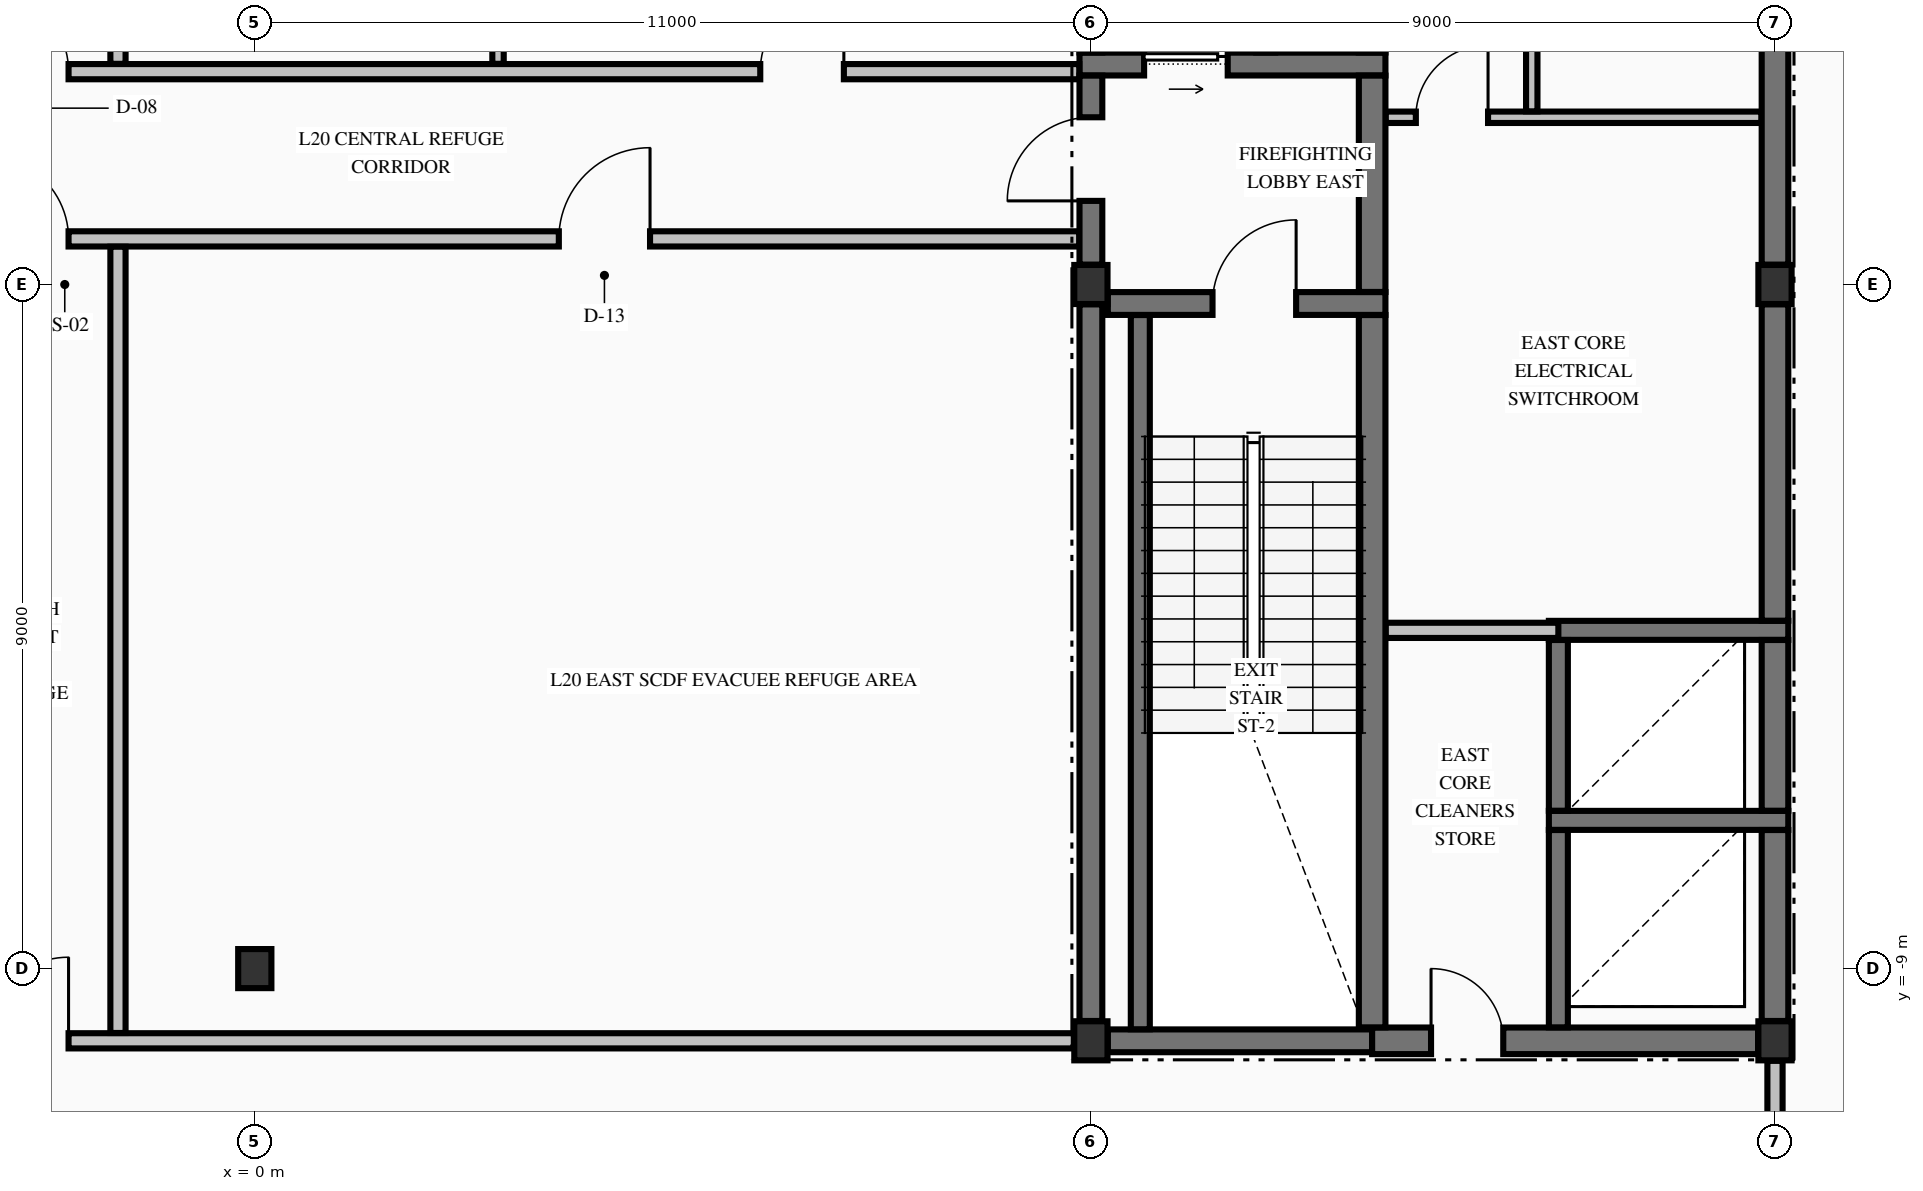
"""IFC4 building model, lengths in metres.
Left out: names, types, materials, properties, quantities, classifications, styles, units other than length and angle.
Written with IfcOpenShell. Run it as: python <this file> out.ifc"""

import sys

from ifc_helpers import new_model, si_unit, direction, frame, frame_2d, origin, origin_2d, place, context, subcontext, project, spatial, rectangle, i_section, extrude, element, fill, save


model = new_model("IFC4")
c1 = context("Model", 3, precision=1e-05, world=origin(), true_north=direction((0.0, 1.0)))
c2 = subcontext(c1, "Body", "Model", "MODEL_VIEW")
j1 = project(units=[si_unit("LENGTHUNIT", "METRE"), si_unit("PLANEANGLEUNIT", "RADIAN")], contexts=[c1])
p1 = place(None, origin())
s1 = spatial("IfcSite", under=j1, at=p1, CompositionType="ELEMENT")
p2 = place(p1, origin())
s2 = spatial("IfcBuilding", under=s1, at=p2, CompositionType="ELEMENT")
p3 = place(p2, frame((0.0, 0.0, 82.18)))
s3 = spatial("IfcBuildingStorey", under=s2, at=p3, CompositionType="ELEMENT", Elevation=82.18)
for number, where, z_axis, x_axis in (
    (1, (11.0, -9.95, -0.425), (0.0, 0.0, 1.0), (1.0, 0.0, 0.0)),
    (2, (11.0, 0.0, -0.425), (0.0, 0.0, 1.0), (1.0, 0.0, 0.0)),
    (3, (20.0, -9.95, -0.425), (0.0, 0.0, 1.0), (1.0, 0.0, 0.0)),
    (4, (0.0, -9.0, -0.425), (0.0, 0.0, 1.0), (1.0, 0.0, 0.0)),
    (5, (20.0, 0.0, -0.425), (0.0, 0.0, 1.0), (1.0, 0.0, 0.0)),
):
    element("IfcColumn", number, at=place(p3, frame(where, z_axis=z_axis, x_axis=x_axis)), inside=s3, PredefinedType="COLUMN", context=c2, shape_type="SweptSolid", body=[
        extrude(i_section(OverallWidth=0.437, OverallDepth=0.514, WebThickness=0.061, FlangeThickness=0.097, FilletRadius=0.015, at=origin_2d()), origin(), (0.0, 0.0, 1.0), 4.76),
    ])
p4 = place(p3, frame((11.222, -9.95, 0.0), z_axis=(0.0, 0.0, 1.0), x_axis=(1.0, 0.0, 0.0)))
e6 = element("IfcWall", 6, at=p4, inside=s3, PredefinedType="SHEAR", context=c2, shape_type="SweptSolid", body=[
    extrude(rectangle(XDim=3.478, YDim=0.3, at=frame_2d((1.739, 0.0))), origin(), (0.0, 0.0, 1.0), 4.335),
])
p5 = place(p3, frame((14.7, -9.95, 0.0), z_axis=(0.0, 0.0, 1.0), x_axis=(1.0, 0.0, 0.0)))
e7 = element("IfcWall", 7, at=p5, inside=s3, PredefinedType="SHEAR", context=c2, shape_type="SweptSolid", body=[
    extrude(rectangle(XDim=5.078, YDim=0.35, at=frame_2d((2.539, 0.0))), origin(), (0.0, 0.0, 1.0), 4.335),
])
p6 = place(p5, frame((0.775, 0.0, 0.0)))
e8 = element("IfcOpeningElement", 8, at=p6, cuts=e7, PredefinedType="OPENING", context=c2, shape_type="SweptSolid", body=[
    extrude(rectangle(XDim=0.95, YDim=2.15, at=frame_2d((0.475, 1.075))), frame((0.0, 0.185, 0.0), z_axis=(0.0, -1.0, 0.0), x_axis=(1.0, 0.0, 0.0)), (0.0, 0.0, 1.0), 0.37),
])
for number, where, z_axis, x_axis in (
    (9, (17.025, -7.05, 0.0), (0.0, 0.0, 1.0), (1.0, 0.0, 0.0)),
    (10, (17.025, -4.55, 0.0), (0.0, 0.0, 1.0), (1.0, 0.0, 0.0)),
):
    element("IfcWall", number, at=place(p3, frame(where, z_axis=z_axis, x_axis=x_axis)), inside=s3, PredefinedType="SOLIDWALL", context=c2, shape_type="SweptSolid", body=[
        extrude(rectangle(XDim=3.15, YDim=0.25, at=frame_2d((1.575, 0.0))), origin(), (0.0, 0.0, 1.0), 4.335),
    ])
p7 = place(p3, frame((11.222, -0.25, 0.0), z_axis=(0.0, 0.0, 1.0), x_axis=(1.0, 0.0, 0.0)))
e11 = element("IfcWall", 11, at=p7, inside=s3, PredefinedType="SHEAR", context=c2, shape_type="SweptSolid", body=[
    extrude(rectangle(XDim=3.653, YDim=0.3, at=frame_2d((1.826, 0.0))), origin(), (0.0, 0.0, 1.0), 4.335),
])
p8 = place(p7, frame((1.377, 0.0, 0.0)))
e12 = element("IfcOpeningElement", 12, at=p8, cuts=e11, PredefinedType="OPENING", context=c2, shape_type="SweptSolid", body=[
    extrude(rectangle(XDim=1.1, YDim=2.15, at=frame_2d((0.55, 1.075))), frame((0.0, 0.16, 0.0), z_axis=(0.0, -1.0, 0.0), x_axis=(1.0, 0.0, 0.0)), (0.0, 0.0, 1.0), 0.32),
])
p9 = place(p3, frame((10.85, 2.9, 0.0), z_axis=(0.0, 0.0, 1.0), x_axis=(1.0, 0.0, 0.0)))
e13 = element("IfcWall", 13, at=p9, inside=s3, PredefinedType="SHEAR", context=c2, shape_type="SweptSolid", body=[
    extrude(rectangle(XDim=4.025, YDim=0.3, at=frame_2d((2.012, 0.0))), origin(), (0.0, 0.0, 1.0), 4.335),
])
p10 = place(p9, frame((0.85, 0.0, 0.0)))
e14 = element("IfcOpeningElement", 14, at=p10, cuts=e13, PredefinedType="OPENING", context=c2, shape_type="SweptSolid", body=[
    extrude(rectangle(XDim=1.1, YDim=2.2, at=frame_2d((0.55, 1.1))), frame((0.0, 0.16, 0.0), z_axis=(0.0, -1.0, 0.0), x_axis=(1.0, 0.0, 0.0)), (0.0, 0.0, 1.0), 0.32),
])
p11 = place(p3, frame((-10.775, -9.95, 0.0), z_axis=(0.0, 0.0, 1.0), x_axis=(1.0, 0.0, 0.0)))
e15 = element("IfcWall", 15, at=p11, inside=s3, PredefinedType="PARTITIONING", context=c2, shape_type="SweptSolid", body=[
    extrude(rectangle(XDim=21.551, YDim=0.2, at=frame_2d((10.775, 0.0))), origin(), (0.0, 0.0, 1.0), 4.335),
])
p12 = place(p11, frame((7.226, 0.0, 0.0)))
e16 = element("IfcOpeningElement", 16, at=p12, cuts=e15, PredefinedType="OPENING", context=c2, shape_type="SweptSolid", body=[
    extrude(rectangle(XDim=1.1, YDim=2.15, at=frame_2d((0.55, 1.075))), frame((0.0, 0.11, 0.0), z_axis=(0.0, -1.0, 0.0), x_axis=(1.0, 0.0, 0.0)), (0.0, 0.0, 1.0), 0.22),
])
p13 = place(p3, frame((14.878, -4.55, 0.0), z_axis=(0.0, 0.0, 1.0), x_axis=(1.0, 0.0, 0.0)))
e17 = element("IfcWall", 17, at=p13, inside=s3, PredefinedType="PARTITIONING", context=c2, shape_type="SweptSolid", body=[
    extrude(rectangle(XDim=2.272, YDim=0.2, at=frame_2d((1.136, 0.0))), origin(), (0.0, 0.0, 1.0), 4.335),
])
p14 = place(p3, frame((-10.847, 0.6, 0.0), z_axis=(0.0, 0.0, 1.0), x_axis=(1.0, 0.0, 0.0)))
e18 = element("IfcWall", 18, at=p14, inside=s3, PredefinedType="PARTITIONING", context=c2, shape_type="SweptSolid", body=[
    extrude(rectangle(XDim=21.694, YDim=0.2, at=frame_2d((10.847, 0.0))), origin(), (0.0, 0.0, 1.0), 4.335),
])
p15 = place(p14, frame((7.297, 0.0, 0.0)))
e19 = element("IfcOpeningElement", 19, at=p15, cuts=e18, PredefinedType="OPENING", context=c2, shape_type="SweptSolid", body=[
    extrude(rectangle(XDim=1.1, YDim=2.15, at=frame_2d((0.55, 1.075))), frame((0.0, 0.11, 0.0), z_axis=(0.0, -1.0, 0.0), x_axis=(1.0, 0.0, 0.0)), (0.0, 0.0, 1.0), 0.22),
])
p16 = place(p14, frame((2.647, 0.0, 0.0)))
e20 = element("IfcOpeningElement", 20, at=p16, cuts=e18, PredefinedType="OPENING", context=c2, shape_type="SweptSolid", body=[
    extrude(rectangle(XDim=1.2, YDim=2.15, at=frame_2d((0.6, 1.075))), frame((0.0, 0.11, 0.0), z_axis=(0.0, -1.0, 0.0), x_axis=(1.0, 0.0, 0.0)), (0.0, 0.0, 1.0), 0.22),
])
p17 = place(p14, frame((14.847, 0.0, 0.0)))
e21 = element("IfcOpeningElement", 21, at=p17, cuts=e18, PredefinedType="OPENING", context=c2, shape_type="SweptSolid", body=[
    extrude(rectangle(XDim=1.2, YDim=2.15, at=frame_2d((0.6, 1.075))), frame((0.0, 0.11, 0.0), z_axis=(0.0, -1.0, 0.0), x_axis=(1.0, 0.0, 0.0)), (0.0, 0.0, 1.0), 0.22),
])
p18 = place(p3, frame((14.878, 2.2, 0.0), z_axis=(0.0, 0.0, 1.0), x_axis=(1.0, 0.0, 0.0)))
e22 = element("IfcWall", 22, at=p18, inside=s3, PredefinedType="PARTITIONING", context=c2, shape_type="SweptSolid", body=[
    extrude(rectangle(XDim=4.944, YDim=0.15, at=frame_2d((2.472, 0.0))), origin(), (0.0, 0.0, 1.0), 4.335),
])
p19 = place(p18, frame((0.397, 0.0, 0.0)))
e23 = element("IfcOpeningElement", 23, at=p19, cuts=e22, PredefinedType="OPENING", context=c2, shape_type="SweptSolid", body=[
    extrude(rectangle(XDim=0.95, YDim=2.15, at=frame_2d((0.475, 1.075))), frame((0.0, 0.085, 0.0), z_axis=(0.0, -1.0, 0.0), x_axis=(1.0, 0.0, 0.0)), (0.0, 0.0, 1.0), 0.17),
])
p20 = place(p3, frame((-10.847, 2.8, 0.0), z_axis=(0.0, 0.0, 1.0), x_axis=(1.0, 0.0, 0.0)))
e24 = element("IfcWall", 24, at=p20, inside=s3, PredefinedType="PARTITIONING", context=c2, shape_type="SweptSolid", body=[
    extrude(rectangle(XDim=21.694, YDim=0.2, at=frame_2d((10.847, 0.0))), origin(), (0.0, 0.0, 1.0), 4.335),
])
p21 = place(p20, frame((7.297, 0.0, 0.0)))
e25 = element("IfcOpeningElement", 25, at=p21, cuts=e24, PredefinedType="OPENING", context=c2, shape_type="SweptSolid", body=[
    extrude(rectangle(XDim=1.1, YDim=2.15, at=frame_2d((0.55, 1.075))), frame((0.0, 0.11, 0.0), z_axis=(0.0, -1.0, 0.0), x_axis=(1.0, 0.0, 0.0)), (0.0, 0.0, 1.0), 0.22),
])
p22 = place(p20, frame((17.497, 0.0, 0.0)))
e26 = element("IfcOpeningElement", 26, at=p22, cuts=e24, PredefinedType="OPENING", context=c2, shape_type="SweptSolid", body=[
    extrude(rectangle(XDim=1.1, YDim=2.15, at=frame_2d((0.55, 1.075))), frame((0.0, 0.11, 0.0), z_axis=(0.0, -1.0, 0.0), x_axis=(1.0, 0.0, 0.0)), (0.0, 0.0, 1.0), 0.22),
])
p23 = place(p3, frame((11.0, -9.689, 0.0), z_axis=(0.0, 0.0, 1.0), x_axis=(0.0, 1.0, 0.0)))
e27 = element("IfcWall", 27, at=p23, inside=s3, PredefinedType="SHEAR", context=c2, shape_type="SweptSolid", body=[
    extrude(rectangle(XDim=9.428, YDim=0.3, at=frame_2d((4.714, 0.0))), origin(), (0.0, 0.0, 1.0), 4.335),
])
p24 = place(p3, frame((11.0, 0.261, 0.0), z_axis=(0.0, 0.0, 1.0), x_axis=(0.0, 1.0, 0.0)))
e28 = element("IfcWall", 28, at=p24, inside=s3, PredefinedType="SHEAR", context=c2, shape_type="SweptSolid", body=[
    extrude(rectangle(XDim=2.487, YDim=0.3, at=frame_2d((1.244, 0.0))), origin(), (0.0, 0.0, 1.0), 4.335),
])
p25 = place(p24, frame((0.839, 0.0, 0.0)))
e29 = element("IfcOpeningElement", 29, at=p25, cuts=e28, PredefinedType="OPENING", context=c2, shape_type="SweptSolid", body=[
    extrude(rectangle(XDim=1.1, YDim=2.15, at=frame_2d((0.55, 1.075))), frame((0.0, 0.16, 0.0), z_axis=(0.0, -1.0, 0.0), x_axis=(1.0, 0.0, 0.0)), (0.0, 0.0, 1.0), 0.32),
])
p26 = place(p3, frame((11.0, 3.052, 0.0), z_axis=(0.0, 0.0, 1.0), x_axis=(0.0, 1.0, 0.0)))
e30 = element("IfcWall", 30, at=p26, inside=s3, PredefinedType="SHEAR", context=c2, shape_type="SweptSolid", body=[
    extrude(rectangle(XDim=2.496, YDim=0.3, at=frame_2d((1.248, 0.0))), origin(), (0.0, 0.0, 1.0), 4.335),
])
p27 = place(p3, frame((11.65, -9.798, 0.0), z_axis=(0.0, 0.0, 1.0), x_axis=(0.0, 1.0, 0.0)))
e31 = element("IfcWall", 31, at=p27, inside=s3, PredefinedType="SOLIDWALL", context=c2, shape_type="SweptSolid", body=[
    extrude(rectangle(XDim=9.396, YDim=0.25, at=frame_2d((4.698, 0.0))), origin(), (0.0, 0.0, 1.0), 4.335),
])
p28 = place(p3, frame((13.3, 3.052, 0.0), z_axis=(0.0, 0.0, 1.0), x_axis=(0.0, 1.0, 0.0)))
e32 = element("IfcWall", 32, at=p28, inside=s3, PredefinedType="SOLIDWALL", context=c2, shape_type="SweptSolid", body=[
    extrude(rectangle(XDim=2.496, YDim=0.25, at=frame_2d((1.248, 0.0))), origin(), (0.0, 0.0, 1.0), 4.335),
])
p29 = place(p3, frame((14.7, -9.773, 0.0), z_axis=(0.0, 0.0, 1.0), x_axis=(0.0, 1.0, 0.0)))
e33 = element("IfcWall", 33, at=p29, inside=s3, PredefinedType="SHEAR", context=c2, shape_type="SweptSolid", body=[
    extrude(rectangle(XDim=9.371, YDim=0.35, at=frame_2d((4.686, 0.0))), origin(), (0.0, 0.0, 1.0), 4.335),
])
p30 = place(p3, frame((14.7, -0.098, 0.0), z_axis=(0.0, 0.0, 1.0), x_axis=(0.0, 1.0, 0.0)))
e34 = element("IfcWall", 34, at=p30, inside=s3, PredefinedType="SHEAR", context=c2, shape_type="SweptSolid", body=[
    extrude(rectangle(XDim=2.846, YDim=0.35, at=frame_2d((1.423, 0.0))), origin(), (0.0, 0.0, 1.0), 4.335),
])
p31 = place(p3, frame((14.7, 3.052, 0.0), z_axis=(0.0, 0.0, 1.0), x_axis=(0.0, 1.0, 0.0)))
e35 = element("IfcWall", 35, at=p31, inside=s3, PredefinedType="SHEAR", context=c2, shape_type="SweptSolid", body=[
    extrude(rectangle(XDim=2.496, YDim=0.35, at=frame_2d((1.248, 0.0))), origin(), (0.0, 0.0, 1.0), 4.335),
])
p32 = place(p3, frame((17.15, -9.773, 0.0), z_axis=(0.0, 0.0, 1.0), x_axis=(0.0, 1.0, 0.0)))
e36 = element("IfcWall", 36, at=p32, inside=s3, PredefinedType="SOLIDWALL", context=c2, shape_type="SweptSolid", body=[
    extrude(rectangle(XDim=2.596, YDim=0.25, at=frame_2d((1.298, 0.0))), origin(), (0.0, 0.0, 1.0), 4.335),
])
p33 = place(p3, frame((17.15, -6.923, 0.0), z_axis=(0.0, 0.0, 1.0), x_axis=(0.0, 1.0, 0.0)))
e37 = element("IfcWall", 37, at=p33, inside=s3, PredefinedType="SOLIDWALL", context=c2, shape_type="SweptSolid", body=[
    extrude(rectangle(XDim=2.246, YDim=0.25, at=frame_2d((1.123, 0.0))), origin(), (0.0, 0.0, 1.0), 4.335),
])
p34 = place(p3, frame((20.0, -9.689, 0.0), z_axis=(0.0, 0.0, 1.0), x_axis=(0.0, 1.0, 0.0)))
e38 = element("IfcWall", 38, at=p34, inside=s3, PredefinedType="SHEAR", context=c2, shape_type="SweptSolid", body=[
    extrude(rectangle(XDim=2.512, YDim=0.35, at=frame_2d((1.256, 0.0))), origin(), (0.0, 0.0, 1.0), 4.335),
])
p35 = place(p3, frame((20.0, -6.923, 0.0), z_axis=(0.0, 0.0, 1.0), x_axis=(0.0, 1.0, 0.0)))
e39 = element("IfcWall", 39, at=p35, inside=s3, PredefinedType="SHEAR", context=c2, shape_type="SweptSolid", body=[
    extrude(rectangle(XDim=2.246, YDim=0.35, at=frame_2d((1.123, 0.0))), origin(), (0.0, 0.0, 1.0), 4.335),
])
p36 = place(p3, frame((20.0, -4.423, 0.0), z_axis=(0.0, 0.0, 1.0), x_axis=(0.0, 1.0, 0.0)))
e40 = element("IfcWall", 40, at=p36, inside=s3, PredefinedType="SHEAR", context=c2, shape_type="SweptSolid", body=[
    extrude(rectangle(XDim=4.162, YDim=0.35, at=frame_2d((2.081, 0.0))), origin(), (0.0, 0.0, 1.0), 4.335),
])
p37 = place(p3, frame((20.0, 0.261, 0.0), z_axis=(0.0, 0.0, 1.0), x_axis=(0.0, 1.0, 0.0)))
e41 = element("IfcWall", 41, at=p37, inside=s3, PredefinedType="SHEAR", context=c2, shape_type="SweptSolid", body=[
    extrude(rectangle(XDim=9.978, YDim=0.35, at=frame_2d((4.989, 0.0))), origin(), (0.0, 0.0, 1.0), 4.335),
])
p38 = place(p3, frame((-1.8, -9.847, 0.0), z_axis=(0.0, 0.0, 1.0), x_axis=(0.0, 1.0, 0.0)))
e42 = element("IfcWall", 42, at=p38, inside=s3, PredefinedType="PARTITIONING", context=c2, shape_type="SweptSolid", body=[
    extrude(rectangle(XDim=10.344, YDim=0.2, at=frame_2d((5.172, 0.0))), origin(), (0.0, 0.0, 1.0), 4.335),
])
p39 = place(p3, frame((-1.8, 2.903, 0.0), z_axis=(0.0, 0.0, 1.0), x_axis=(0.0, 1.0, 0.0)))
e43 = element("IfcWall", 43, at=p39, inside=s3, PredefinedType="PARTITIONING", context=c2, shape_type="SweptSolid", body=[
    extrude(rectangle(XDim=3.594, YDim=0.2, at=frame_2d((1.797, 0.0))), origin(), (0.0, 0.0, 1.0), 4.335),
])
p40 = place(p39, frame((1.322, 0.0, 0.0)))
e44 = element("IfcOpeningElement", 44, at=p40, cuts=e43, PredefinedType="OPENING", context=c2, shape_type="SweptSolid", body=[
    extrude(rectangle(XDim=0.95, YDim=2.15, at=frame_2d((0.475, 1.075))), frame((0.0, 0.11, 0.0), z_axis=(0.0, -1.0, 0.0), x_axis=(1.0, 0.0, 0.0)), (0.0, 0.0, 1.0), 0.22),
])
p41 = place(p3, frame((3.2, 2.903, 0.0), z_axis=(0.0, 0.0, 1.0), x_axis=(0.0, 1.0, 0.0)))
e45 = element("IfcWall", 45, at=p41, inside=s3, PredefinedType="PARTITIONING", context=c2, shape_type="SweptSolid", body=[
    extrude(rectangle(XDim=3.594, YDim=0.15, at=frame_2d((1.797, 0.0))), origin(), (0.0, 0.0, 1.0), 4.335),
])
p42 = place(p3, frame((16.8, 2.278, 0.0), z_axis=(0.0, 0.0, 1.0), x_axis=(0.0, 1.0, 0.0)))
e46 = element("IfcWall", 46, at=p42, inside=s3, PredefinedType="PARTITIONING", context=c2, shape_type="SweptSolid", body=[
    extrude(rectangle(XDim=4.144, YDim=0.15, at=frame_2d((2.072, 0.0))), origin(), (0.0, 0.0, 1.0), 4.335),
])
p43 = place(p3, frame((20.0, -12.697, 0.0), z_axis=(0.0, 0.0, 1.0), x_axis=(0.0, 1.0, 0.0)))
e47 = element("IfcWall", 47, at=p43, inside=s3, PredefinedType="PARTITIONING", context=c2, shape_type="SweptSolid", body=[
    extrude(rectangle(XDim=2.484, YDim=0.2, at=frame_2d((1.242, 0.0))), origin(), (0.0, 0.0, 1.0), 4.335),
])
p44 = place(p8, origin())
e48 = element("IfcDoor", 48, at=p44, inside=s3, OperationType="SINGLE_SWING_RIGHT", PredefinedType="DOOR", context=c2, shape_type="SweptSolid", body=[
    extrude(rectangle(XDim=1.1, YDim=2.15, at=frame_2d((0.55, 1.075))), frame((0.0, 0.025, 0.0), z_axis=(0.0, -1.0, 0.0), x_axis=(1.0, 0.0, 0.0)), (0.0, 0.0, 1.0), 0.05),
])
fill(e12, e48)
p45 = place(p25, origin())
e49 = element("IfcDoor", 49, at=p45, inside=s3, OperationType="SINGLE_SWING_LEFT", PredefinedType="DOOR", context=c2, shape_type="SweptSolid", body=[
    extrude(rectangle(XDim=1.1, YDim=2.15, at=frame_2d((0.55, 1.075))), frame((0.0, 0.025, 0.0), z_axis=(0.0, -1.0, 0.0), x_axis=(1.0, 0.0, 0.0)), (0.0, 0.0, 1.0), 0.05),
])
fill(e29, e49)
p46 = place(p10, origin())
e50 = element("IfcDoor", 50, at=p46, inside=s3, OperationType="SLIDING_TO_RIGHT", PredefinedType="DOOR", context=c2, shape_type="SweptSolid", body=[
    extrude(rectangle(XDim=1.1, YDim=2.2, at=frame_2d((0.55, 1.1))), frame((0.0, 0.025, 0.0), z_axis=(0.0, -1.0, 0.0), x_axis=(1.0, 0.0, 0.0)), (0.0, 0.0, 1.0), 0.05),
])
fill(e14, e50)
p47 = place(p6, origin())
e51 = element("IfcDoor", 51, at=p47, inside=s3, OperationType="SINGLE_SWING_LEFT", PredefinedType="DOOR", context=c2, shape_type="SweptSolid", body=[
    extrude(rectangle(XDim=0.95, YDim=2.15, at=frame_2d((0.475, 1.075))), frame((0.0, 0.025, 0.0), z_axis=(0.0, -1.0, 0.0), x_axis=(1.0, 0.0, 0.0)), (0.0, 0.0, 1.0), 0.05),
])
fill(e8, e51)
p48 = place(p19, origin())
e52 = element("IfcDoor", 52, at=p48, inside=s3, OperationType="SINGLE_SWING_RIGHT", PredefinedType="DOOR", context=c2, shape_type="SweptSolid", body=[
    extrude(rectangle(XDim=0.95, YDim=2.15, at=frame_2d((0.475, 1.075))), frame((0.0, 0.025, 0.0), z_axis=(0.0, -1.0, 0.0), x_axis=(1.0, 0.0, 0.0)), (0.0, 0.0, 1.0), 0.05),
])
fill(e23, e52)
p49 = place(p21, origin())
e53 = element("IfcDoor", 53, at=p49, inside=s3, OperationType="SINGLE_SWING_LEFT", PredefinedType="DOOR", context=c2, shape_type="SweptSolid", body=[
    extrude(rectangle(XDim=1.1, YDim=2.15, at=frame_2d((0.55, 1.075))), frame((0.0, 0.025, 0.0), z_axis=(0.0, -1.0, 0.0), x_axis=(1.0, 0.0, 0.0)), (0.0, 0.0, 1.0), 0.05),
])
fill(e25, e53)
p50 = place(p15, origin())
e54 = element("IfcDoor", 54, at=p50, inside=s3, OperationType="SINGLE_SWING_LEFT", PredefinedType="DOOR", context=c2, shape_type="SweptSolid", body=[
    extrude(rectangle(XDim=1.1, YDim=2.15, at=frame_2d((0.55, 1.075))), frame((0.0, 0.025, 0.0), z_axis=(0.0, -1.0, 0.0), x_axis=(1.0, 0.0, 0.0)), (0.0, 0.0, 1.0), 0.05),
])
fill(e19, e54)
p51 = place(p12, origin())
e55 = element("IfcDoor", 55, at=p51, inside=s3, OperationType="SINGLE_SWING_RIGHT", PredefinedType="DOOR", context=c2, shape_type="SweptSolid", body=[
    extrude(rectangle(XDim=1.1, YDim=2.15, at=frame_2d((0.55, 1.075))), frame((0.0, 0.025, 0.0), z_axis=(0.0, -1.0, 0.0), x_axis=(1.0, 0.0, 0.0)), (0.0, 0.0, 1.0), 0.05),
])
fill(e16, e55)
p52 = place(p17, origin())
e56 = element("IfcDoor", 56, at=p52, inside=s3, OperationType="SINGLE_SWING_RIGHT", PredefinedType="DOOR", context=c2, shape_type="SweptSolid", body=[
    extrude(rectangle(XDim=1.2, YDim=2.15, at=frame_2d((0.6, 1.075))), frame((0.0, 0.025, 0.0), z_axis=(0.0, -1.0, 0.0), x_axis=(1.0, 0.0, 0.0)), (0.0, 0.0, 1.0), 0.05),
])
fill(e21, e56)
p53 = place(p22, origin())
e57 = element("IfcDoor", 57, at=p53, inside=s3, OperationType="SINGLE_SWING_RIGHT", PredefinedType="DOOR", context=c2, shape_type="SweptSolid", body=[
    extrude(rectangle(XDim=1.1, YDim=2.15, at=frame_2d((0.55, 1.075))), frame((0.0, 0.025, 0.0), z_axis=(0.0, -1.0, 0.0), x_axis=(1.0, 0.0, 0.0)), (0.0, 0.0, 1.0), 0.05),
])
fill(e26, e57)
save(model, sys.argv[1])
